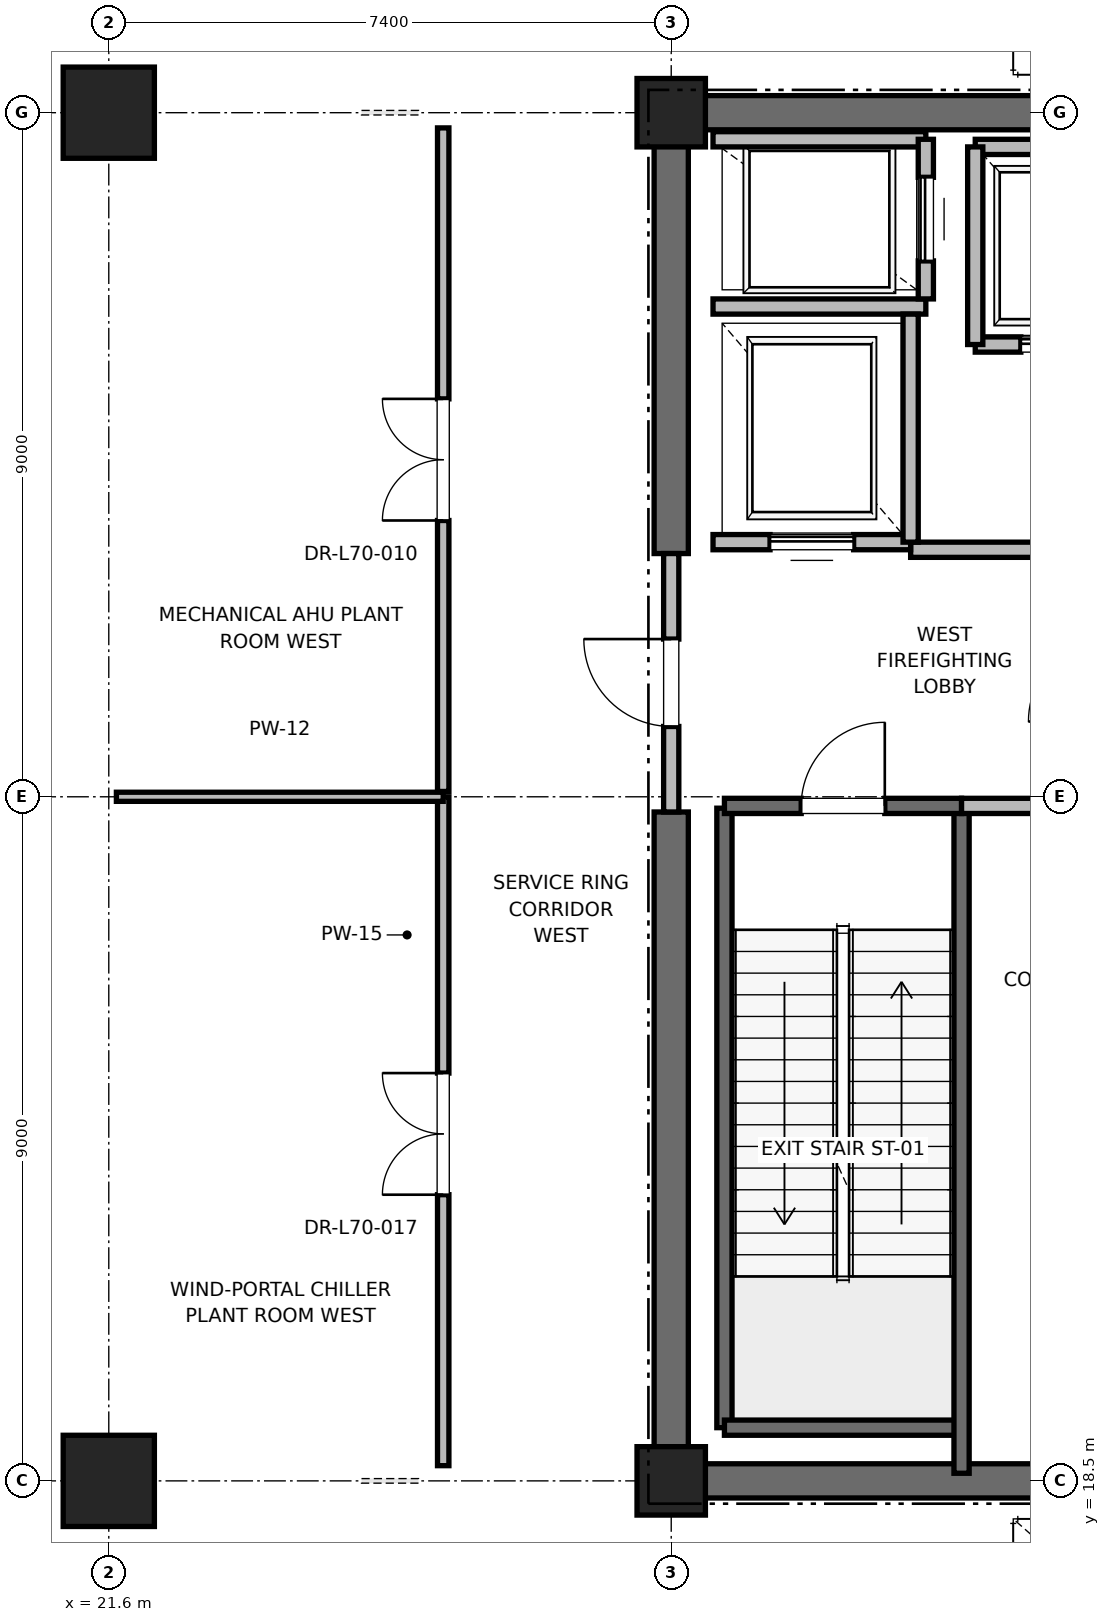
"""IFC4 building model, lengths in metres.
Left out: names, types, materials, properties, quantities, classifications, styles, units other than length and angle.
Written with IfcOpenShell. Run it as: python <this file> out.ifc"""

import sys

from ifc_helpers import new_model, si_unit, direction, frame, frame_2d, origin, origin_2d, place, context, subcontext, project, spatial, rectangle, extrude, element, fill, save


model = new_model("IFC4")
c1 = context("Model", 3, precision=1e-05, world=origin(), true_north=direction((0.0, 1.0)))
c2 = subcontext(c1, "Body", "Model", "MODEL_VIEW")
j1 = project(units=[si_unit("LENGTHUNIT", "METRE"), si_unit("PLANEANGLEUNIT", "RADIAN")], contexts=[c1])
p1 = place(None, origin())
s1 = spatial("IfcSite", under=j1, at=p1, CompositionType="ELEMENT")
p2 = place(p1, origin())
s2 = spatial("IfcBuilding", under=s1, at=p2, CompositionType="ELEMENT")
p3 = place(p2, frame((0.0, 0.0, 301.0)))
s3 = spatial("IfcBuildingStorey", under=s2, at=p3, CompositionType="ELEMENT", Elevation=301.0)
for number, where, z_axis, x_axis in (
    (1, (21.6, 18.5, 0.0), (0.0, 0.0, 1.0), (1.0, 0.0, 0.0)),
    (2, (21.6, 36.5, 0.0), (0.0, 0.0, 1.0), (1.0, 0.0, 0.0)),
):
    element("IfcColumn", number, at=place(p3, frame(where, z_axis=z_axis, x_axis=x_axis)), inside=s3, PredefinedType="COLUMN", context=c2, shape_type="SweptSolid", body=[
        extrude(rectangle(XDim=1.2, YDim=1.2, at=origin_2d()), origin(), (0.0, 0.0, 1.0), 5.8),
    ])
for number, where, z_axis, x_axis in (
    (3, (29.0, 18.5, 0.0), (0.0, 0.0, 1.0), (1.0, 0.0, 0.0)),
    (4, (29.0, 36.5, 0.0), (0.0, 0.0, 1.0), (1.0, 0.0, 0.0)),
):
    element("IfcColumn", number, at=place(p3, frame(where, z_axis=z_axis, x_axis=x_axis)), inside=s3, PredefinedType="PILASTER", context=c2, shape_type="SweptSolid", body=[
        extrude(rectangle(XDim=0.9, YDim=0.9, at=origin_2d()), origin(), (0.0, 0.0, 1.0), 5.8),
    ])
p4 = place(p3, frame((29.0, 18.5, 0.0), z_axis=(0.0, 0.0, 1.0), x_axis=(1.0, 0.0, 0.0)))
e5 = element("IfcWall", 5, at=p4, inside=s3, PredefinedType="SHEAR", context=c2, shape_type="SweptSolid", body=[
    extrude(rectangle(XDim=9.2, YDim=0.45, at=frame_2d((4.6, 0.0))), origin(), (0.0, 0.0, 1.0), 5.585),
])
p5 = place(p3, frame((29.0, 36.5, 0.0), z_axis=(0.0, 0.0, 1.0), x_axis=(1.0, 0.0, 0.0)))
e6 = element("IfcWall", 6, at=p5, inside=s3, PredefinedType="SHEAR", context=c2, shape_type="SweptSolid", body=[
    extrude(rectangle(XDim=5.8, YDim=0.45, at=frame_2d((2.9, 0.0))), origin(), (0.0, 0.0, 1.0), 5.585),
])
p6 = place(p3, frame((29.0, 18.5, 0.0), z_axis=(0.0, 0.0, 1.0), x_axis=(0.0, 1.0, 0.0)))
e7 = element("IfcWall", 7, at=p6, inside=s3, PredefinedType="SHEAR", context=c2, shape_type="SweptSolid", body=[
    extrude(rectangle(XDim=8.8, YDim=0.45, at=frame_2d((4.4, 0.0))), origin(), (0.0, 0.0, 1.0), 5.585),
])
p7 = place(p3, frame((29.0, 30.7, 0.0), z_axis=(0.0, 0.0, 1.0), x_axis=(0.0, 1.0, 0.0)))
e8 = element("IfcWall", 8, at=p7, inside=s3, PredefinedType="SHEAR", context=c2, shape_type="SweptSolid", body=[
    extrude(rectangle(XDim=5.8, YDim=0.45, at=frame_2d((2.9, 0.0))), origin(), (0.0, 0.0, 1.0), 5.585),
])
p8 = place(p3, frame((29.7, 19.2, 0.0), z_axis=(0.0, 0.0, 1.0), x_axis=(0.0, 1.0, 0.0)))
e9 = element("IfcWall", 9, at=p8, inside=s3, PredefinedType="SOLIDWALL", context=c2, shape_type="SweptSolid", body=[
    extrude(rectangle(XDim=8.15, YDim=0.2, at=frame_2d((4.075, 0.0))), origin(), (0.0, 0.0, 1.0), 5.585),
])
p9 = place(p3, frame((29.7, 19.2, 0.0), z_axis=(0.0, 0.0, 1.0), x_axis=(1.0, 0.0, 0.0)))
e10 = element("IfcWall", 10, at=p9, inside=s3, PredefinedType="SOLIDWALL", context=c2, shape_type="SweptSolid", body=[
    extrude(rectangle(XDim=3.12, YDim=0.2, at=frame_2d((1.56, 0.0))), origin(), (0.0, 0.0, 1.0), 5.585),
])
p10 = place(p3, frame((32.82, 18.6, 0.0), z_axis=(0.0, 0.0, 1.0), x_axis=(0.0, 1.0, 0.0)))
e11 = element("IfcWall", 11, at=p10, inside=s3, PredefinedType="SOLIDWALL", context=c2, shape_type="SweptSolid", body=[
    extrude(rectangle(XDim=8.78, YDim=0.2, at=frame_2d((4.39, 0.0))), origin(), (0.0, 0.0, 1.0), 5.585),
])
p11 = place(p3, frame((29.7, 27.38, 0.0), z_axis=(0.0, 0.0, 1.0), x_axis=(1.0, 0.0, 0.0)))
e12 = element("IfcWall", 12, at=p11, inside=s3, PredefinedType="SOLIDWALL", context=c2, shape_type="SweptSolid", body=[
    extrude(rectangle(XDim=3.12, YDim=0.2, at=frame_2d((1.56, 0.0))), origin(), (0.0, 0.0, 1.0), 5.585),
])
p12 = place(p11, frame((1.01, 0.0, 0.0)))
e13 = element("IfcOpeningElement", 13, at=p12, cuts=e12, PredefinedType="OPENING", context=c2, shape_type="SweptSolid", body=[
    extrude(rectangle(XDim=1.1, YDim=2.15, at=frame_2d((0.55, 1.075))), frame((0.0, 0.1, 0.0), z_axis=(0.0, -1.0, 0.0), x_axis=(1.0, 0.0, 0.0)), (0.0, 0.0, 1.0), 0.2),
])
p13 = place(p3, frame((29.0, 27.3, 0.0), z_axis=(0.0, 0.0, 1.0), x_axis=(0.0, 1.0, 0.0)))
e14 = element("IfcWall", 14, at=p13, inside=s3, PredefinedType="PARTITIONING", context=c2, shape_type="SweptSolid", body=[
    extrude(rectangle(XDim=3.4, YDim=0.2, at=frame_2d((1.7, 0.0))), origin(), (0.0, 0.0, 1.0), 4.665),
])
p14 = place(p13, frame((1.125, 0.0, 0.0)))
e15 = element("IfcOpeningElement", 15, at=p14, cuts=e14, PredefinedType="OPENING", context=c2, shape_type="SweptSolid", body=[
    extrude(rectangle(XDim=1.15, YDim=2.2, at=frame_2d((0.575, 1.1))), frame((0.0, 0.1, 0.0), z_axis=(0.0, -1.0, 0.0), x_axis=(1.0, 0.0, 0.0)), (0.0, 0.0, 1.0), 0.2),
])
p15 = place(p3, frame((32.82, 27.38, 0.0), z_axis=(0.0, 0.0, 1.0), x_axis=(1.0, 0.0, 0.0)))
e16 = element("IfcWall", 16, at=p15, inside=s3, PredefinedType="PARTITIONING", context=c2, shape_type="SweptSolid", body=[
    extrude(rectangle(XDim=5.62, YDim=0.2, at=frame_2d((2.81, 0.0))), origin(), (0.0, 0.0, 1.0), 5.585),
])
p16 = place(p3, frame((32.15, 30.75, 0.0), z_axis=(0.0, 0.0, 1.0), x_axis=(1.0, 0.0, 0.0)))
e17 = element("IfcWall", 17, at=p16, inside=s3, PredefinedType="PARTITIONING", context=c2, shape_type="SweptSolid", body=[
    extrude(rectangle(XDim=2.7, YDim=0.2, at=frame_2d((1.35, 0.0))), origin(), (0.0, 0.0, 1.0), 5.585),
])
p17 = place(p3, frame((29.55, 30.85, 0.0), z_axis=(0.0, 0.0, 1.0), x_axis=(1.0, 0.0, 0.0)))
e18 = element("IfcWall", 18, at=p17, inside=s3, PredefinedType="SOLIDWALL", context=c2, shape_type="SweptSolid", body=[
    extrude(rectangle(XDim=2.6, YDim=0.2, at=frame_2d((1.3, 0.0))), origin(), (0.0, 0.0, 1.0), 4.665),
])
p18 = place(p17, frame((0.75, 0.0, 0.0)))
e19 = element("IfcOpeningElement", 19, at=p18, cuts=e18, PredefinedType="OPENING", context=c2, shape_type="SweptSolid", body=[
    extrude(rectangle(XDim=1.1, YDim=2.2, at=frame_2d((0.55, 1.1))), frame((0.0, 0.1, 0.0), z_axis=(0.0, -1.0, 0.0), x_axis=(1.0, 0.0, 0.0)), (0.0, 0.0, 1.0), 0.2),
])
p19 = place(p3, frame((29.55, 33.95, 0.0), z_axis=(0.0, 0.0, 1.0), x_axis=(1.0, 0.0, 0.0)))
e20 = element("IfcWall", 20, at=p19, inside=s3, PredefinedType="SOLIDWALL", context=c2, shape_type="SweptSolid", body=[
    extrude(rectangle(XDim=2.8, YDim=0.2, at=frame_2d((1.4, 0.0))), origin(), (0.0, 0.0, 1.0), 5.585),
])
p20 = place(p3, frame((32.15, 30.85, 0.0), z_axis=(0.0, 0.0, 1.0), x_axis=(0.0, 1.0, 0.0)))
e21 = element("IfcWall", 21, at=p20, inside=s3, PredefinedType="SOLIDWALL", context=c2, shape_type="SweptSolid", body=[
    extrude(rectangle(XDim=3.0, YDim=0.2, at=frame_2d((1.5, 0.0))), origin(), (0.0, 0.0, 1.0), 5.585),
])
p21 = place(p3, frame((32.35, 36.15, 0.0), z_axis=(0.0, 0.0, 1.0), x_axis=(-1.0, 0.0, 0.0)))
e22 = element("IfcWall", 22, at=p21, inside=s3, PredefinedType="SOLIDWALL", context=c2, shape_type="SweptSolid", body=[
    extrude(rectangle(XDim=2.8, YDim=0.2, at=frame_2d((1.4, 0.0))), origin(), (0.0, 0.0, 1.0), 4.638),
])
p22 = place(p3, frame((32.35, 34.05, 0.0), z_axis=(0.0, 0.0, 1.0), x_axis=(0.0, 1.0, 0.0)))
e23 = element("IfcWall", 23, at=p22, inside=s3, PredefinedType="SOLIDWALL", context=c2, shape_type="SweptSolid", body=[
    extrude(rectangle(XDim=2.1, YDim=0.2, at=frame_2d((1.05, 0.0))), origin(), (0.0, 0.0, 1.0), 5.585),
])
p23 = place(p22, frame((0.5, 0.0, 0.0)))
e24 = element("IfcOpeningElement", 24, at=p23, cuts=e23, PredefinedType="OPENING", context=c2, shape_type="SweptSolid", body=[
    extrude(rectangle(XDim=1.1, YDim=2.2, at=frame_2d((0.55, 1.1))), frame((0.0, 0.1, 0.0), z_axis=(0.0, -1.0, 0.0), x_axis=(1.0, 0.0, 0.0)), (0.0, 0.0, 1.0), 0.2),
])
p24 = place(p3, frame((33.0, 33.45, 0.0), z_axis=(0.0, 0.0, 1.0), x_axis=(1.0, 0.0, 0.0)))
e25 = element("IfcWall", 25, at=p24, inside=s3, PredefinedType="SOLIDWALL", context=c2, shape_type="SweptSolid", body=[
    extrude(rectangle(XDim=2.3, YDim=0.2, at=frame_2d((1.15, 0.0))), origin(), (0.0, 0.0, 1.0), 5.585),
])
p25 = place(p24, frame((0.6, 0.0, 0.0)))
e26 = element("IfcOpeningElement", 26, at=p25, cuts=e25, PredefinedType="OPENING", context=c2, shape_type="SweptSolid", body=[
    extrude(rectangle(XDim=1.1, YDim=2.2, at=frame_2d((0.55, 1.1))), frame((0.0, 0.1, 0.0), z_axis=(0.0, -1.0, 0.0), x_axis=(1.0, 0.0, 0.0)), (0.0, 0.0, 1.0), 0.2),
])
p26 = place(p3, frame((35.3, 36.05, 0.0), z_axis=(0.0, 0.0, 1.0), x_axis=(-1.0, 0.0, 0.0)))
e27 = element("IfcWall", 27, at=p26, inside=s3, PredefinedType="SOLIDWALL", context=c2, shape_type="SweptSolid", body=[
    extrude(rectangle(XDim=2.3, YDim=0.2, at=frame_2d((1.15, 0.0))), origin(), (0.0, 0.0, 1.0), 4.665),
])
p27 = place(p3, frame((33.0, 36.05, 0.0), z_axis=(0.0, 0.0, 1.0), x_axis=(0.0, -1.0, 0.0)))
e28 = element("IfcWall", 28, at=p27, inside=s3, PredefinedType="SOLIDWALL", context=c2, shape_type="SweptSolid", body=[
    extrude(rectangle(XDim=2.6, YDim=0.2, at=frame_2d((1.3, 0.0))), origin(), (0.0, 0.0, 1.0), 5.585),
])
p28 = place(p3, frame((26.0, 18.7, 0.0), z_axis=(0.0, 0.0, 1.0), x_axis=(0.0, 1.0, 0.0)))
e29 = element("IfcWall", 29, at=p28, inside=s3, PredefinedType="PARTITIONING", context=c2, shape_type="SweptSolid", body=[
    extrude(rectangle(XDim=8.8, YDim=0.15, at=frame_2d((4.4, 0.0))), origin(), (0.0, 0.0, 1.0), 2.85),
])
p29 = place(p28, frame((3.565, 0.0, 0.0)))
e30 = element("IfcOpeningElement", 30, at=p29, cuts=e29, PredefinedType="OPENING", context=c2, shape_type="SweptSolid", body=[
    extrude(rectangle(XDim=1.6, YDim=2.25, at=frame_2d((0.8, 1.125))), frame((0.0, 0.075, 0.0), z_axis=(0.0, -1.0, 0.0), x_axis=(1.0, 0.0, 0.0)), (0.0, 0.0, 1.0), 0.15),
])
p30 = place(p3, frame((21.7, 27.5, 0.0), z_axis=(0.0, 0.0, 1.0), x_axis=(1.0, 0.0, 0.0)))
e31 = element("IfcWall", 31, at=p30, inside=s3, PredefinedType="PARTITIONING", context=c2, shape_type="SweptSolid", body=[
    extrude(rectangle(XDim=4.3, YDim=0.12, at=frame_2d((2.15, 0.0))), origin(), (0.0, 0.0, 1.0), 2.85),
])
p31 = place(p3, frame((26.0, 27.57, 0.0), z_axis=(0.0, 0.0, 1.0), x_axis=(0.0, 1.0, 0.0)))
e32 = element("IfcWall", 32, at=p31, inside=s3, PredefinedType="PARTITIONING", context=c2, shape_type="SweptSolid", body=[
    extrude(rectangle(XDim=8.73, YDim=0.15, at=frame_2d((4.365, 0.0))), origin(), (0.0, 0.0, 1.0), 2.85),
])
p32 = place(p31, frame((3.565, 0.0, 0.0)))
e33 = element("IfcOpeningElement", 33, at=p32, cuts=e32, PredefinedType="OPENING", context=c2, shape_type="SweptSolid", body=[
    extrude(rectangle(XDim=1.6, YDim=2.25, at=frame_2d((0.8, 1.125))), frame((0.0, 0.075, 0.0), z_axis=(0.0, -1.0, 0.0), x_axis=(1.0, 0.0, 0.0)), (0.0, 0.0, 1.0), 0.15),
])
p33 = place(p12, origin())
e34 = element("IfcDoor", 34, at=p33, inside=s3, OperationType="SINGLE_SWING_RIGHT", PredefinedType="DOOR", context=c2, shape_type="SweptSolid", body=[
    extrude(rectangle(XDim=1.1, YDim=2.15, at=frame_2d((0.55, 1.075))), frame((0.0, 0.025, 0.0), z_axis=(0.0, -1.0, 0.0), x_axis=(1.0, 0.0, 0.0)), (0.0, 0.0, 1.0), 0.05),
])
fill(e13, e34)
p34 = place(p14, origin())
e35 = element("IfcDoor", 35, at=p34, inside=s3, OperationType="SINGLE_SWING_RIGHT", PredefinedType="DOOR", context=c2, shape_type="SweptSolid", body=[
    extrude(rectangle(XDim=1.15, YDim=2.2, at=frame_2d((0.575, 1.1))), frame((0.0, 0.025, 0.0), z_axis=(0.0, -1.0, 0.0), x_axis=(1.0, 0.0, 0.0)), (0.0, 0.0, 1.0), 0.05),
])
fill(e15, e35)
p35 = place(p18, origin())
e36 = element("IfcDoor", 36, at=p35, inside=s3, OperationType="SLIDING_TO_RIGHT", PredefinedType="DOOR", context=c2, shape_type="SweptSolid", body=[
    extrude(rectangle(XDim=1.1, YDim=2.2, at=frame_2d((0.55, 1.1))), frame((0.0, 0.025, 0.0), z_axis=(0.0, -1.0, 0.0), x_axis=(1.0, 0.0, 0.0)), (0.0, 0.0, 1.0), 0.05),
])
fill(e19, e36)
p36 = place(p23, origin())
e37 = element("IfcDoor", 37, at=p36, inside=s3, OperationType="SLIDING_TO_RIGHT", PredefinedType="DOOR", context=c2, shape_type="SweptSolid", body=[
    extrude(rectangle(XDim=1.1, YDim=2.2, at=frame_2d((0.55, 1.1))), frame((0.0, 0.025, 0.0), z_axis=(0.0, -1.0, 0.0), x_axis=(1.0, 0.0, 0.0)), (0.0, 0.0, 1.0), 0.05),
])
fill(e24, e37)
p37 = place(p25, origin())
e38 = element("IfcDoor", 38, at=p37, inside=s3, OperationType="SLIDING_TO_RIGHT", PredefinedType="DOOR", context=c2, shape_type="SweptSolid", body=[
    extrude(rectangle(XDim=1.1, YDim=2.2, at=frame_2d((0.55, 1.1))), frame((0.0, 0.025, 0.0), z_axis=(0.0, -1.0, 0.0), x_axis=(1.0, 0.0, 0.0)), (0.0, 0.0, 1.0), 0.05),
])
fill(e26, e38)
p38 = place(p29, origin())
e39 = element("IfcDoor", 39, at=p38, inside=s3, OperationType="DOUBLE_DOOR_SINGLE_SWING", PredefinedType="DOOR", context=c2, shape_type="SweptSolid", body=[
    extrude(rectangle(XDim=1.6, YDim=2.25, at=frame_2d((0.8, 1.125))), frame((0.0, 0.025, 0.0), z_axis=(0.0, -1.0, 0.0), x_axis=(1.0, 0.0, 0.0)), (0.0, 0.0, 1.0), 0.05),
])
fill(e30, e39)
p39 = place(p32, origin())
e40 = element("IfcDoor", 40, at=p39, inside=s3, OperationType="DOUBLE_DOOR_SINGLE_SWING", PredefinedType="DOOR", context=c2, shape_type="SweptSolid", body=[
    extrude(rectangle(XDim=1.6, YDim=2.25, at=frame_2d((0.8, 1.125))), frame((0.0, 0.025, 0.0), z_axis=(0.0, -1.0, 0.0), x_axis=(1.0, 0.0, 0.0)), (0.0, 0.0, 1.0), 0.05),
])
fill(e33, e40)
save(model, sys.argv[1])
